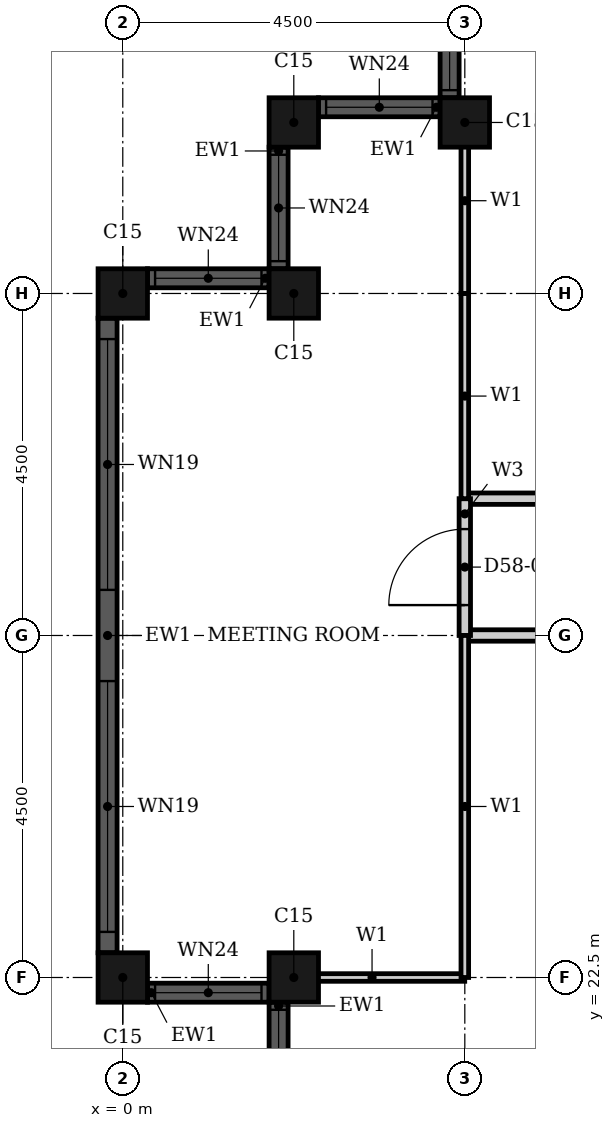
"""IFC4 building model, lengths in metres.
Left out: names, types, materials, properties, quantities, classifications, styles, units other than length and angle.
Written with IfcOpenShell. Run it as: python <this file> out.ifc"""

import sys

from ifc_helpers import new_model, si_unit, direction, frame, frame_2d, origin, origin_2d, place, context, subcontext, project, spatial, rectangle, hollow_rectangle, extrude, element, fill, save


model = new_model("IFC4")
c1 = context("Model", 3, precision=1e-05, world=origin(), true_north=direction((0.0, 1.0)))
c2 = subcontext(c1, "Body", "Model", "MODEL_VIEW")
j1 = project(units=[si_unit("LENGTHUNIT", "METRE"), si_unit("PLANEANGLEUNIT", "RADIAN")], contexts=[c1])
p1 = place(None, origin())
s1 = spatial("IfcSite", under=j1, at=p1, CompositionType="ELEMENT")
p2 = place(p1, origin())
s2 = spatial("IfcBuilding", under=s1, at=p2, CompositionType="ELEMENT")
p3 = place(p2, frame((0.0, 0.0, 229.4)))
s3 = spatial("IfcBuildingStorey", under=s2, at=p3, CompositionType="ELEMENT", Elevation=229.4)
for number, where, z_axis, x_axis in (
    (1, (4.5, 33.75, 0.0), (0.0, 0.0, 1.0), (1.0, 0.0, 0.0)),
    (2, (2.25, 33.75, 0.0), (0.0, 0.0, 1.0), (1.0, 0.0, 0.0)),
    (3, (2.25, 31.5, 0.0), (0.0, 0.0, 1.0), (1.0, 0.0, 0.0)),
    (4, (0.0, 31.5, 0.0), (0.0, 0.0, 1.0), (1.0, 0.0, 0.0)),
    (5, (0.0, 22.5, 0.0), (0.0, 0.0, 1.0), (1.0, 0.0, 0.0)),
    (6, (2.25, 22.5, 0.0), (0.0, 0.0, 1.0), (1.0, 0.0, 0.0)),
):
    element("IfcColumn", number, at=place(p3, frame(where, z_axis=z_axis, x_axis=x_axis)), inside=s3, PredefinedType="COLUMN", context=c2, shape_type="SweptSolid", body=[
        extrude(hollow_rectangle(XDim=0.65, YDim=0.65, WallThickness=0.021, at=origin_2d()), origin(), (0.0, 0.0, 1.0), 3.7),
    ])
p4 = place(p3, frame((4.3, 35.675, 0.0), z_axis=(0.0, 0.0, 1.0), x_axis=(0.0, -1.0, 0.0)))
e7 = element("IfcWall", 7, at=p4, inside=s3, PredefinedType="SOLIDWALL", context=c2, shape_type="SweptSolid", body=[
    extrude(rectangle(XDim=1.6, YDim=0.25, at=frame_2d((0.8, 0.0))), origin(), (0.0, 0.0, 1.0), 3.7),
])
p5 = place(p4, frame((0.1, 0.0, 0.9)))
e8 = element("IfcOpeningElement", 8, at=p5, cuts=e7, PredefinedType="OPENING", context=c2, shape_type="SweptSolid", body=[
    extrude(rectangle(XDim=1.4, YDim=1.75, at=frame_2d((0.7, 0.875))), frame((0.0, 0.135, 0.0), z_axis=(0.0, -1.0, 0.0), x_axis=(1.0, 0.0, 0.0)), (0.0, 0.0, 1.0), 0.27),
])
p6 = place(p3, frame((4.175, 33.95, 0.0), z_axis=(0.0, 0.0, 1.0), x_axis=(-1.0, 0.0, 0.0)))
e9 = element("IfcWall", 9, at=p6, inside=s3, PredefinedType="SOLIDWALL", context=c2, shape_type="SweptSolid", body=[
    extrude(rectangle(XDim=1.6, YDim=0.25, at=frame_2d((0.8, 0.0))), origin(), (0.0, 0.0, 1.0), 3.7),
])
p7 = place(p6, frame((0.1, 0.0, 0.9)))
e10 = element("IfcOpeningElement", 10, at=p7, cuts=e9, PredefinedType="OPENING", context=c2, shape_type="SweptSolid", body=[
    extrude(rectangle(XDim=1.4, YDim=1.75, at=frame_2d((0.7, 0.875))), frame((0.0, 0.135, 0.0), z_axis=(0.0, -1.0, 0.0), x_axis=(1.0, 0.0, 0.0)), (0.0, 0.0, 1.0), 0.27),
])
p8 = place(p3, frame((2.05, 33.425, 0.0), z_axis=(0.0, 0.0, 1.0), x_axis=(0.0, -1.0, 0.0)))
e11 = element("IfcWall", 11, at=p8, inside=s3, PredefinedType="SOLIDWALL", context=c2, shape_type="SweptSolid", body=[
    extrude(rectangle(XDim=1.6, YDim=0.25, at=frame_2d((0.8, 0.0))), origin(), (0.0, 0.0, 1.0), 3.7),
])
p9 = place(p8, frame((0.1, 0.0, 0.9)))
e12 = element("IfcOpeningElement", 12, at=p9, cuts=e11, PredefinedType="OPENING", context=c2, shape_type="SweptSolid", body=[
    extrude(rectangle(XDim=1.4, YDim=1.75, at=frame_2d((0.7, 0.875))), frame((0.0, 0.135, 0.0), z_axis=(0.0, -1.0, 0.0), x_axis=(1.0, 0.0, 0.0)), (0.0, 0.0, 1.0), 0.27),
])
p10 = place(p3, frame((1.925, 31.7, 0.0), z_axis=(0.0, 0.0, 1.0), x_axis=(-1.0, 0.0, 0.0)))
e13 = element("IfcWall", 13, at=p10, inside=s3, PredefinedType="SOLIDWALL", context=c2, shape_type="SweptSolid", body=[
    extrude(rectangle(XDim=1.6, YDim=0.25, at=frame_2d((0.8, 0.0))), origin(), (0.0, 0.0, 1.0), 3.7),
])
p11 = place(p10, frame((0.1, 0.0, 0.9)))
e14 = element("IfcOpeningElement", 14, at=p11, cuts=e13, PredefinedType="OPENING", context=c2, shape_type="SweptSolid", body=[
    extrude(rectangle(XDim=1.4, YDim=1.75, at=frame_2d((0.7, 0.875))), frame((0.0, 0.135, 0.0), z_axis=(0.0, -1.0, 0.0), x_axis=(1.0, 0.0, 0.0)), (0.0, 0.0, 1.0), 0.27),
])
p12 = place(p3, frame((-0.2, 31.175, 0.0), z_axis=(0.0, 0.0, 1.0), x_axis=(0.0, -1.0, 0.0)))
e15 = element("IfcWall", 15, at=p12, inside=s3, PredefinedType="SOLIDWALL", context=c2, shape_type="SweptSolid", body=[
    extrude(rectangle(XDim=8.35, YDim=0.25, at=frame_2d((4.175, 0.0))), origin(), (0.0, 0.0, 1.0), 3.7),
])
p13 = place(p12, frame((0.275, 0.0, 0.45)))
e16 = element("IfcOpeningElement", 16, at=p13, cuts=e15, PredefinedType="OPENING", context=c2, shape_type="SweptSolid", body=[
    extrude(rectangle(XDim=3.3, YDim=2.2, at=frame_2d((1.65, 1.1))), frame((0.0, 0.135, 0.0), z_axis=(0.0, -1.0, 0.0), x_axis=(1.0, 0.0, 0.0)), (0.0, 0.0, 1.0), 0.27),
])
p14 = place(p12, frame((4.775, 0.0, 0.45)))
e17 = element("IfcOpeningElement", 17, at=p14, cuts=e15, PredefinedType="OPENING", context=c2, shape_type="SweptSolid", body=[
    extrude(rectangle(XDim=3.3, YDim=2.2, at=frame_2d((1.65, 1.1))), frame((0.0, 0.135, 0.0), z_axis=(0.0, -1.0, 0.0), x_axis=(1.0, 0.0, 0.0)), (0.0, 0.0, 1.0), 0.27),
])
p15 = place(p3, frame((0.325, 22.3, 0.0), z_axis=(0.0, 0.0, 1.0), x_axis=(1.0, 0.0, 0.0)))
e18 = element("IfcWall", 18, at=p15, inside=s3, PredefinedType="SOLIDWALL", context=c2, shape_type="SweptSolid", body=[
    extrude(rectangle(XDim=1.6, YDim=0.25, at=frame_2d((0.8, 0.0))), origin(), (0.0, 0.0, 1.0), 3.7),
])
p16 = place(p15, frame((0.1, 0.0, 0.9)))
e19 = element("IfcOpeningElement", 19, at=p16, cuts=e18, PredefinedType="OPENING", context=c2, shape_type="SweptSolid", body=[
    extrude(rectangle(XDim=1.4, YDim=1.75, at=frame_2d((0.7, 0.875))), frame((0.0, 0.135, 0.0), z_axis=(0.0, -1.0, 0.0), x_axis=(1.0, 0.0, 0.0)), (0.0, 0.0, 1.0), 0.27),
])
p17 = place(p3, frame((2.05, 22.175, 0.0), z_axis=(0.0, 0.0, 1.0), x_axis=(0.0, -1.0, 0.0)))
e20 = element("IfcWall", 20, at=p17, inside=s3, PredefinedType="SOLIDWALL", context=c2, shape_type="SweptSolid", body=[
    extrude(rectangle(XDim=1.6, YDim=0.25, at=frame_2d((0.8, 0.0))), origin(), (0.0, 0.0, 1.0), 3.7),
])
p18 = place(p17, frame((0.1, 0.0, 0.9)))
e21 = element("IfcOpeningElement", 21, at=p18, cuts=e20, PredefinedType="OPENING", context=c2, shape_type="SweptSolid", body=[
    extrude(rectangle(XDim=1.4, YDim=1.75, at=frame_2d((0.7, 0.875))), frame((0.0, 0.135, 0.0), z_axis=(0.0, -1.0, 0.0), x_axis=(1.0, 0.0, 0.0)), (0.0, 0.0, 1.0), 0.27),
])
p19 = place(p3, frame((4.5, 27.0, 0.0), z_axis=(0.0, 0.0, 1.0), x_axis=(1.0, 0.0, 0.0)))
e22 = element("IfcWall", 22, at=p19, inside=s3, PredefinedType="PARTITIONING", context=c2, shape_type="SweptSolid", body=[
    extrude(rectangle(XDim=13.5, YDim=0.15, at=frame_2d((6.75, 0.0))), origin(), (0.0, 0.0, 1.0), 2.58),
])
p20 = place(p19, frame((5.35, 0.0, 0.0)))
e23 = element("IfcOpeningElement", 23, at=p20, cuts=e22, PredefinedType="OPENING", context=c2, shape_type="SweptSolid", body=[
    extrude(rectangle(XDim=1.0, YDim=2.1, at=frame_2d((0.5, 1.05))), frame((0.0, 0.085, 0.0), z_axis=(0.0, -1.0, 0.0), x_axis=(1.0, 0.0, 0.0)), (0.0, 0.0, 1.0), 0.17),
])
p21 = place(p3, frame((4.5, 28.8, 0.0), z_axis=(0.0, 0.0, 1.0), x_axis=(1.0, 0.0, 0.0)))
e24 = element("IfcWall", 24, at=p21, inside=s3, PredefinedType="PARTITIONING", context=c2, shape_type="SweptSolid", body=[
    extrude(rectangle(XDim=11.699, YDim=0.15, at=frame_2d((5.85, 0.0))), origin(), (0.0, 0.0, 1.0), 3.3),
])
p22 = place(p21, frame((4.0, 0.0, 0.0)))
e25 = element("IfcOpeningElement", 25, at=p22, cuts=e24, PredefinedType="OPENING", context=c2, shape_type="SweptSolid", body=[
    extrude(rectangle(XDim=1.0, YDim=2.1, at=frame_2d((0.5, 1.05))), frame((0.0, 0.085, 0.0), z_axis=(0.0, -1.0, 0.0), x_axis=(1.0, 0.0, 0.0)), (0.0, 0.0, 1.0), 0.17),
])
p23 = place(p3, frame((4.5, 27.0, 0.0), z_axis=(0.0, 0.0, 1.0), x_axis=(0.0, 1.0, 0.0)))
e26 = element("IfcWall", 26, at=p23, inside=s3, PredefinedType="PARTITIONING", context=c2, shape_type="SweptSolid", body=[
    extrude(rectangle(XDim=1.8, YDim=0.15, at=frame_2d((0.9, 0.0))), origin(), (0.0, 0.0, 1.0), 3.3),
])
p24 = place(p23, frame((0.4, 0.0, 0.0)))
e27 = element("IfcOpeningElement", 27, at=p24, cuts=e26, PredefinedType="OPENING", context=c2, shape_type="SweptSolid", body=[
    extrude(rectangle(XDim=1.0, YDim=2.1, at=frame_2d((0.5, 1.05))), frame((0.0, 0.085, 0.0), z_axis=(0.0, -1.0, 0.0), x_axis=(1.0, 0.0, 0.0)), (0.0, 0.0, 1.0), 0.17),
])
p25 = place(p3, frame((2.06, 22.5, 0.0), z_axis=(0.0, 0.0, 1.0), x_axis=(1.0, 0.0, 0.0)))
e28 = element("IfcWall", 28, at=p25, inside=s3, PredefinedType="PARTITIONING", context=c2, shape_type="SweptSolid", body=[
    extrude(rectangle(XDim=2.439, YDim=0.1, at=frame_2d((1.219, 0.0))), origin(), (0.0, 0.0, 1.0), 2.58),
])
p26 = place(p3, frame((4.5, 28.8, 0.0), z_axis=(0.0, 0.0, 1.0), x_axis=(0.0, 1.0, 0.0)))
e29 = element("IfcWall", 29, at=p26, inside=s3, PredefinedType="PARTITIONING", context=c2, shape_type="SweptSolid", body=[
    extrude(rectangle(XDim=2.7, YDim=0.1, at=frame_2d((1.35, 0.0))), origin(), (0.0, 0.0, 1.0), 3.3),
])
p27 = place(p3, frame((4.5, 31.501, 0.0), z_axis=(0.0, 0.0, 1.0), x_axis=(0.0, 1.0, 0.0)))
e30 = element("IfcWall", 30, at=p27, inside=s3, PredefinedType="PARTITIONING", context=c2, shape_type="SweptSolid", body=[
    extrude(rectangle(XDim=2.439, YDim=0.1, at=frame_2d((1.219, 0.0))), origin(), (0.0, 0.0, 1.0), 3.3),
])
p28 = place(p3, frame((4.5, 22.5, 0.0), z_axis=(0.0, 0.0, 1.0), x_axis=(0.0, 1.0, 0.0)))
e31 = element("IfcWall", 31, at=p28, inside=s3, PredefinedType="PARTITIONING", context=c2, shape_type="SweptSolid", body=[
    extrude(rectangle(XDim=4.5, YDim=0.1, at=frame_2d((2.25, 0.0))), origin(), (0.0, 0.0, 1.0), 3.3),
])
p29 = place(p5, origin())
e32 = element("IfcWindow", 32, at=p29, inside=s3, PartitioningType="SINGLE_PANEL", PredefinedType="WINDOW", context=c2, shape_type="SweptSolid", body=[
    extrude(rectangle(XDim=1.4, YDim=1.75, at=frame_2d((0.7, 0.875))), frame((0.0, 0.03, 0.0), z_axis=(0.0, -1.0, 0.0), x_axis=(1.0, 0.0, 0.0)), (0.0, 0.0, 1.0), 0.06),
])
fill(e8, e32)
p30 = place(p7, origin())
e33 = element("IfcWindow", 33, at=p30, inside=s3, PartitioningType="SINGLE_PANEL", PredefinedType="WINDOW", context=c2, shape_type="SweptSolid", body=[
    extrude(rectangle(XDim=1.4, YDim=1.75, at=frame_2d((0.7, 0.875))), frame((0.0, 0.03, 0.0), z_axis=(0.0, -1.0, 0.0), x_axis=(1.0, 0.0, 0.0)), (0.0, 0.0, 1.0), 0.06),
])
fill(e10, e33)
p31 = place(p9, origin())
e34 = element("IfcWindow", 34, at=p31, inside=s3, PartitioningType="SINGLE_PANEL", PredefinedType="WINDOW", context=c2, shape_type="SweptSolid", body=[
    extrude(rectangle(XDim=1.4, YDim=1.75, at=frame_2d((0.7, 0.875))), frame((0.0, 0.03, 0.0), z_axis=(0.0, -1.0, 0.0), x_axis=(1.0, 0.0, 0.0)), (0.0, 0.0, 1.0), 0.06),
])
fill(e12, e34)
p32 = place(p11, origin())
e35 = element("IfcWindow", 35, at=p32, inside=s3, PartitioningType="SINGLE_PANEL", PredefinedType="WINDOW", context=c2, shape_type="SweptSolid", body=[
    extrude(rectangle(XDim=1.4, YDim=1.75, at=frame_2d((0.7, 0.875))), frame((0.0, 0.03, 0.0), z_axis=(0.0, -1.0, 0.0), x_axis=(1.0, 0.0, 0.0)), (0.0, 0.0, 1.0), 0.06),
])
fill(e14, e35)
p33 = place(p13, origin())
e36 = element("IfcWindow", 36, at=p33, inside=s3, PartitioningType="SINGLE_PANEL", PredefinedType="WINDOW", context=c2, shape_type="SweptSolid", body=[
    extrude(rectangle(XDim=3.3, YDim=2.2, at=frame_2d((1.65, 1.1))), frame((0.0, 0.03, 0.0), z_axis=(0.0, -1.0, 0.0), x_axis=(1.0, 0.0, 0.0)), (0.0, 0.0, 1.0), 0.06),
])
fill(e16, e36)
p34 = place(p14, origin())
e37 = element("IfcWindow", 37, at=p34, inside=s3, PartitioningType="SINGLE_PANEL", PredefinedType="WINDOW", context=c2, shape_type="SweptSolid", body=[
    extrude(rectangle(XDim=3.3, YDim=2.2, at=frame_2d((1.65, 1.1))), frame((0.0, 0.03, 0.0), z_axis=(0.0, -1.0, 0.0), x_axis=(1.0, 0.0, 0.0)), (0.0, 0.0, 1.0), 0.06),
])
fill(e17, e37)
p35 = place(p16, origin())
e38 = element("IfcWindow", 38, at=p35, inside=s3, PartitioningType="SINGLE_PANEL", PredefinedType="WINDOW", context=c2, shape_type="SweptSolid", body=[
    extrude(rectangle(XDim=1.4, YDim=1.75, at=frame_2d((0.7, 0.875))), frame((0.0, 0.03, 0.0), z_axis=(0.0, -1.0, 0.0), x_axis=(1.0, 0.0, 0.0)), (0.0, 0.0, 1.0), 0.06),
])
fill(e19, e38)
p36 = place(p18, origin())
e39 = element("IfcWindow", 39, at=p36, inside=s3, PartitioningType="SINGLE_PANEL", PredefinedType="WINDOW", context=c2, shape_type="SweptSolid", body=[
    extrude(rectangle(XDim=1.4, YDim=1.75, at=frame_2d((0.7, 0.875))), frame((0.0, 0.03, 0.0), z_axis=(0.0, -1.0, 0.0), x_axis=(1.0, 0.0, 0.0)), (0.0, 0.0, 1.0), 0.06),
])
fill(e21, e39)
p37 = place(p24, origin())
e40 = element("IfcDoor", 40, at=p37, inside=s3, OperationType="SINGLE_SWING_LEFT", PredefinedType="DOOR", context=c2, shape_type="SweptSolid", body=[
    extrude(rectangle(XDim=1.0, YDim=2.1, at=frame_2d((0.5, 1.05))), frame((0.0, 0.025, 0.0), z_axis=(0.0, -1.0, 0.0), x_axis=(1.0, 0.0, 0.0)), (0.0, 0.0, 1.0), 0.05),
])
fill(e27, e40)
save(model, sys.argv[1])
